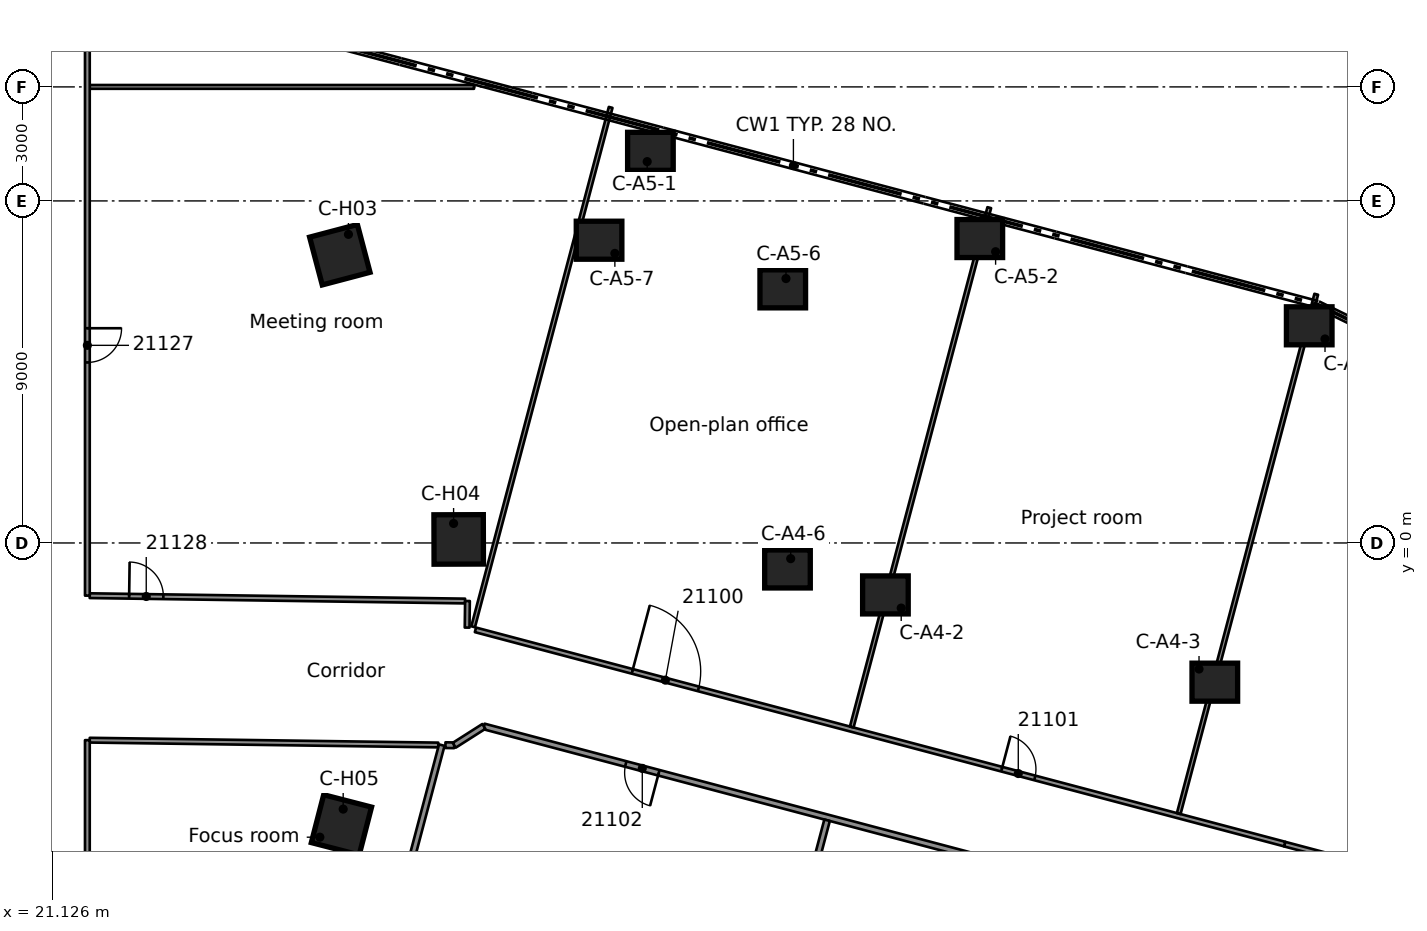
"""IFC4 building model, lengths in metres.
Left out: names, types, materials, properties, quantities, classifications, styles, units other than length and angle.
Written with IfcOpenShell. Run it as: python <this file> out.ifc"""

import sys

from ifc_helpers import new_model, si_unit, direction, frame, frame_2d, origin, origin_2d, place, context, subcontext, project, spatial, rectangle, extrude, element, fill, save


model = new_model("IFC4")
c1 = context("Model", 3, precision=1e-05, world=origin(), true_north=direction((0.0, 1.0)))
c2 = subcontext(c1, "Body", "Model", "MODEL_VIEW")
j1 = project(units=[si_unit("LENGTHUNIT", "METRE"), si_unit("PLANEANGLEUNIT", "RADIAN")], contexts=[c1])
p1 = place(None, origin())
s1 = spatial("IfcSite", under=j1, at=p1, CompositionType="ELEMENT")
p2 = place(p1, origin())
s2 = spatial("IfcBuilding", under=s1, at=p2, CompositionType="ELEMENT")
p3 = place(p2, frame((0.0, 0.0, 105.7)))
s3 = spatial("IfcBuildingStorey", under=s2, at=p3, CompositionType="ELEMENT", Elevation=105.7)
for number, where, z_axis, x_axis in (
    (1, (43.051, -1.367, 0.0), (0.0, 0.0, 1.0), (1.0, 0.0, 0.0)),
    (2, (51.719, -3.663, 0.0), (0.0, 0.0, 1.0), (1.0, 0.0, 0.0)),
    (3, (40.474, -0.684, 0.0), (0.0, 0.0, 1.0), (1.0, 0.0, 0.0)),
    (4, (36.867, 10.305, 0.0), (0.0, 0.0, 1.0), (1.0, 0.0, 0.0)),
    (5, (45.535, 8.01, 0.0), (0.0, 0.0, 1.0), (1.0, 0.0, 0.0)),
    (6, (54.203, 5.714, 0.0), (0.0, 0.0, 1.0), (1.0, 0.0, 0.0)),
    (7, (40.35, 6.686, 0.0), (0.0, 0.0, 1.0), (1.0, 0.0, 0.0)),
    (8, (35.516, 7.966, 0.0), (0.0, 0.0, 1.0), (1.0, 0.0, 0.0)),
):
    element("IfcColumn", number, at=place(p3, frame(where, z_axis=z_axis, x_axis=x_axis)), inside=s3, PredefinedType="COLUMN", context=c2, shape_type="SweptSolid", body=[
        extrude(rectangle(XDim=1.2, YDim=1.0, at=origin_2d()), origin(), (0.0, 0.0, 1.0), 3.5),
    ])
for number, where, z_axis, x_axis in (
    (9, (28.694, 7.584, 0.0), (0.0, 0.0, 1.0), (0.967, 0.256, 0.0)),
    (10, (31.822, 0.093, 0.0), (0.0, 0.0, 1.0), (1.0, 0.003, 0.0)),
    (11, (28.737, -7.417, 0.0), (0.0, 0.0, 1.0), (0.968, -0.25, 0.0)),
):
    element("IfcColumn", number, at=place(p3, frame(where, z_axis=z_axis, x_axis=x_axis)), inside=s3, PredefinedType="COLUMN", context=c2, shape_type="SweptSolid", body=[
        extrude(rectangle(XDim=1.3, YDim=1.3, at=origin_2d()), origin(), (0.0, 0.0, 1.0), 3.5),
    ])
p4 = place(p3, frame((56.106, -8.6, 0.0), z_axis=(0.0, 0.0, 1.0), x_axis=(-0.966610224472, 0.256251193065, 0.0)))
e12 = element("IfcWall", 12, at=p4, inside=s3, PredefinedType="PARTITIONING", context=c2, shape_type="SweptSolid", body=[
    extrude(rectangle(XDim=2.638, YDim=0.125, at=frame_2d((1.319, 0.0))), origin(), (0.0, 0.0, 1.0), 3.08),
])
p5 = place(p3, frame((52.881, -10.228, 0.0), z_axis=(0.0, 0.0, 1.0), x_axis=(-0.966683420864, 0.255974928122, 0.0)))
e13 = element("IfcWall", 13, at=p5, inside=s3, PredefinedType="PARTITIONING", context=c2, shape_type="SweptSolid", body=[
    extrude(rectangle(XDim=21.1, YDim=0.15, at=frame_2d((10.55, 0.0))), origin(), (0.0, 0.0, 1.0), 3.08),
])
p6 = place(p5, frame((16.337, 0.0, 0.0)))
e14 = element("IfcOpeningElement", 14, at=p6, cuts=e13, PredefinedType="OPENING", context=c2, shape_type="SweptSolid", body=[
    extrude(rectangle(XDim=0.9, YDim=2.1, at=frame_2d((0.45, 1.05))), frame((0.0, 0.085, 0.0), z_axis=(0.0, -1.0, 0.0), x_axis=(1.0, 0.0, 0.0)), (0.0, 0.0, 1.0), 0.17),
])
p7 = place(p3, frame((32.263, -2.286, 0.0), z_axis=(0.0, 0.0, 1.0), x_axis=(0.966698776393, -0.255916931288, 0.0)))
e15 = element("IfcWall", 15, at=p7, inside=s3, PredefinedType="PARTITIONING", context=c2, shape_type="SweptSolid", body=[
    extrude(rectangle(XDim=22.028, YDim=0.125, at=frame_2d((11.014, 0.0))), origin(), (0.0, 0.0, 1.0), 3.08),
])
p8 = place(p7, frame((4.27, 0.0, 0.0)))
e16 = element("IfcOpeningElement", 16, at=p8, cuts=e15, PredefinedType="OPENING", context=c2, shape_type="SweptSolid", body=[
    extrude(rectangle(XDim=1.8, YDim=2.1, at=frame_2d((0.9, 1.05))), frame((0.0, 0.073, 0.0), z_axis=(0.0, -1.0, 0.0), x_axis=(1.0, 0.0, 0.0)), (0.0, 0.0, 1.0), 0.145),
])
p9 = place(p7, frame((14.326, 0.0, 0.0)))
e17 = element("IfcOpeningElement", 17, at=p9, cuts=e15, PredefinedType="OPENING", context=c2, shape_type="SweptSolid", body=[
    extrude(rectangle(XDim=0.9, YDim=2.1, at=frame_2d((0.45, 1.05))), frame((0.0, 0.073, 0.0), z_axis=(0.0, -1.0, 0.0), x_axis=(1.0, 0.0, 0.0)), (0.0, 0.0, 1.0), 0.145),
])
p10 = place(p3, frame((31.473, -5.32, 0.0), z_axis=(0.0, 0.0, 1.0), x_axis=(0.999857302277, -0.016893048402, 0.0)))
e18 = element("IfcWall", 18, at=p10, inside=s3, PredefinedType="PARTITIONING", context=c2, shape_type="SweptSolid", body=[
    extrude(rectangle(XDim=0.231, YDim=0.15, at=frame_2d((0.116, 0.0))), origin(), (0.0, 0.0, 1.0), 3.08),
])
p11 = place(p3, frame((22.113, -5.189, 0.0), z_axis=(0.0, 0.0, 1.0), x_axis=(0.99990421927, -0.013840241536, 0.0)))
e19 = element("IfcWall", 19, at=p11, inside=s3, PredefinedType="PARTITIONING", context=c2, shape_type="SweptSolid", body=[
    extrude(rectangle(XDim=9.173, YDim=0.125, at=frame_2d((4.586, 0.0))), origin(), (0.0, 0.0, 1.0), 3.08),
])
p12 = place(p3, frame((22.113, -1.387, 0.0), z_axis=(0.0, 0.0, 1.0), x_axis=(0.999897954627, -0.01428566882, 0.0)))
e20 = element("IfcWall", 20, at=p12, inside=s3, PredefinedType="PARTITIONING", context=c2, shape_type="SweptSolid", body=[
    extrude(rectangle(XDim=9.878, YDim=0.125, at=frame_2d((4.939, 0.0))), origin(), (0.0, 0.0, 1.0), 3.08),
])
p13 = place(p12, frame((1.038, 0.0, 0.0)))
e21 = element("IfcOpeningElement", 21, at=p13, cuts=e20, PredefinedType="OPENING", context=c2, shape_type="SweptSolid", body=[
    extrude(rectangle(XDim=0.9, YDim=2.1, at=frame_2d((0.45, 1.05))), frame((0.0, 0.073, 0.0), z_axis=(0.0, -1.0, 0.0), x_axis=(1.0, 0.0, 0.0)), (0.0, 0.0, 1.0), 0.145),
])
p14 = place(p3, frame((22.113, 12.0, 0.0), z_axis=(0.0, 0.0, 1.0), x_axis=(1.0, 0.0, 0.0)))
e22 = element("IfcWall", 22, at=p14, inside=s3, PredefinedType="PARTITIONING", context=c2, shape_type="SweptSolid", body=[
    extrude(rectangle(XDim=10.113, YDim=0.1, at=frame_2d((5.057, 0.0))), origin(), (0.0, 0.0, 1.0), 3.08),
])
p15 = place(p3, frame((50.769, -7.122, 0.0), z_axis=(0.0, 0.0, 1.0), x_axis=(0.255986543434, 0.966680345089, 0.0)))
e23 = element("IfcWall", 23, at=p15, inside=s3, PredefinedType="PARTITIONING", context=c2, shape_type="SweptSolid", body=[
    extrude(rectangle(XDim=14.137, YDim=0.1, at=frame_2d((7.068, 0.0))), origin(), (0.0, 0.0, 1.0), 3.08),
])
p16 = place(p3, frame((39.685, -14.208, 0.0), z_axis=(0.0, 0.0, 1.0), x_axis=(0.256072738338, 0.966657515711, 0.0)))
e24 = element("IfcWall", 24, at=p16, inside=s3, PredefinedType="PARTITIONING", context=c2, shape_type="SweptSolid", body=[
    extrude(rectangle(XDim=7.151, YDim=0.15, at=frame_2d((3.575, 0.0))), origin(), (0.0, 0.0, 1.0), 3.08),
])
p17 = place(p3, frame((42.165, -4.843, 0.0), z_axis=(0.0, 0.0, 1.0), x_axis=(0.255986543434, 0.966680345089, 0.0)))
e25 = element("IfcWall", 25, at=p17, inside=s3, PredefinedType="PARTITIONING", context=c2, shape_type="SweptSolid", body=[
    extrude(rectangle(XDim=14.137, YDim=0.1, at=frame_2d((7.068, 0.0))), origin(), (0.0, 0.0, 1.0), 3.08),
])
p18 = place(p3, frame((29.883, -10.96, 0.0), z_axis=(0.0, 0.0, 1.0), x_axis=(0.256008704633, 0.966674476311, 0.0)))
e26 = element("IfcWall", 26, at=p18, inside=s3, PredefinedType="PARTITIONING", context=c2, shape_type="SweptSolid", body=[
    extrude(rectangle(XDim=5.835, YDim=0.15, at=frame_2d((2.918, 0.0))), origin(), (0.0, 0.0, 1.0), 3.08),
])
p19 = place(p3, frame((32.202, -2.205, 0.0), z_axis=(0.0, 0.0, 1.0), x_axis=(0.256002681219, 0.966676071499, 0.0)))
e27 = element("IfcWall", 27, at=p19, inside=s3, PredefinedType="PARTITIONING", context=c2, shape_type="SweptSolid", body=[
    extrude(rectangle(XDim=14.137, YDim=0.1, at=frame_2d((7.069, 0.0))), origin(), (0.0, 0.0, 1.0), 3.08),
])
p20 = place(p3, frame((31.705, -5.323, 0.0), z_axis=(0.0, 0.0, 1.0), x_axis=(0.84342189249, 0.537251813649, 0.0)))
e28 = element("IfcWall", 28, at=p20, inside=s3, PredefinedType="PARTITIONING", context=c2, shape_type="SweptSolid", body=[
    extrude(rectangle(XDim=0.923, YDim=0.15, at=frame_2d((0.462, 0.0))), origin(), (0.0, 0.0, 1.0), 3.08),
])
p21 = place(p3, frame((32.044, -2.227, 0.0), z_axis=(0.0, 0.0, 1.0), x_axis=(0.01290440153, 0.999916734744, 0.0)))
e29 = element("IfcWall", 29, at=p21, inside=s3, PredefinedType="PARTITIONING", context=c2, shape_type="SweptSolid", body=[
    extrude(rectangle(XDim=0.7, YDim=0.125, at=frame_2d((0.35, 0.0))), origin(), (0.0, 0.0, 1.0), 3.08),
])
p22 = place(p3, frame((22.051, -10.007, 0.0), z_axis=(0.0, 0.0, 1.0), x_axis=(0.0, 1.0, 0.0)))
e30 = element("IfcWall", 30, at=p22, inside=s3, PredefinedType="PARTITIONING", context=c2, shape_type="SweptSolid", body=[
    extrude(rectangle(XDim=4.819, YDim=0.125, at=frame_2d((2.41, 0.0))), origin(), (0.0, 0.0, 1.0), 3.08),
])
p23 = place(p3, frame((22.051, 15.05, 0.0), z_axis=(0.0, 0.0, 1.0), x_axis=(0.0, -1.0, 0.0)))
e31 = element("IfcWall", 31, at=p23, inside=s3, PredefinedType="PARTITIONING", context=c2, shape_type="SweptSolid", body=[
    extrude(rectangle(XDim=16.436, YDim=0.125, at=frame_2d((8.218, 0.0))), origin(), (0.0, 0.0, 1.0), 3.08),
])
p24 = place(p23, frame((9.4, 0.0, 0.0)))
e32 = element("IfcOpeningElement", 32, at=p24, cuts=e31, PredefinedType="OPENING", context=c2, shape_type="SweptSolid", body=[
    extrude(rectangle(XDim=0.9, YDim=2.1, at=frame_2d((0.45, 1.05))), frame((0.0, 0.073, 0.0), z_axis=(0.0, -1.0, 0.0), x_axis=(1.0, 0.0, 0.0)), (0.0, 0.0, 1.0), 0.145),
])
p25 = place(p8, origin())
e33 = element("IfcDoor", 33, at=p25, inside=s3, OperationType="DOUBLE_DOOR_SINGLE_SWING", PredefinedType="DOOR", context=c2, shape_type="SweptSolid", body=[
    extrude(rectangle(XDim=1.8, YDim=2.1, at=frame_2d((0.9, 1.05))), frame((0.0, 0.025, 0.0), z_axis=(0.0, -1.0, 0.0), x_axis=(1.0, 0.0, 0.0)), (0.0, 0.0, 1.0), 0.05),
])
fill(e16, e33)
p26 = place(p9, origin())
e34 = element("IfcDoor", 34, at=p26, inside=s3, OperationType="SINGLE_SWING_RIGHT", PredefinedType="DOOR", context=c2, shape_type="SweptSolid", body=[
    extrude(rectangle(XDim=0.9, YDim=2.1, at=frame_2d((0.45, 1.05))), frame((0.0, 0.025, 0.0), z_axis=(0.0, -1.0, 0.0), x_axis=(1.0, 0.0, 0.0)), (0.0, 0.0, 1.0), 0.05),
])
fill(e17, e34)
p27 = place(p6, origin())
e35 = element("IfcDoor", 35, at=p27, inside=s3, OperationType="SINGLE_SWING_RIGHT", PredefinedType="DOOR", context=c2, shape_type="SweptSolid", body=[
    extrude(rectangle(XDim=0.9, YDim=2.1, at=frame_2d((0.45, 1.05))), frame((0.0, 0.025, 0.0), z_axis=(0.0, -1.0, 0.0), x_axis=(1.0, 0.0, 0.0)), (0.0, 0.0, 1.0), 0.05),
])
fill(e14, e35)
p28 = place(p24, origin())
e36 = element("IfcDoor", 36, at=p28, inside=s3, OperationType="SINGLE_SWING_RIGHT", PredefinedType="DOOR", context=c2, shape_type="SweptSolid", body=[
    extrude(rectangle(XDim=0.9, YDim=2.1, at=frame_2d((0.45, 1.05))), frame((0.0, 0.025, 0.0), z_axis=(0.0, -1.0, 0.0), x_axis=(1.0, 0.0, 0.0)), (0.0, 0.0, 1.0), 0.05),
])
fill(e32, e36)
p29 = place(p13, origin())
e37 = element("IfcDoor", 37, at=p29, inside=s3, OperationType="SINGLE_SWING_LEFT", PredefinedType="DOOR", context=c2, shape_type="SweptSolid", body=[
    extrude(rectangle(XDim=0.9, YDim=2.1, at=frame_2d((0.45, 1.05))), frame((0.0, 0.025, 0.0), z_axis=(0.0, -1.0, 0.0), x_axis=(1.0, 0.0, 0.0)), (0.0, 0.0, 1.0), 0.05),
])
fill(e21, e37)
save(model, sys.argv[1])
